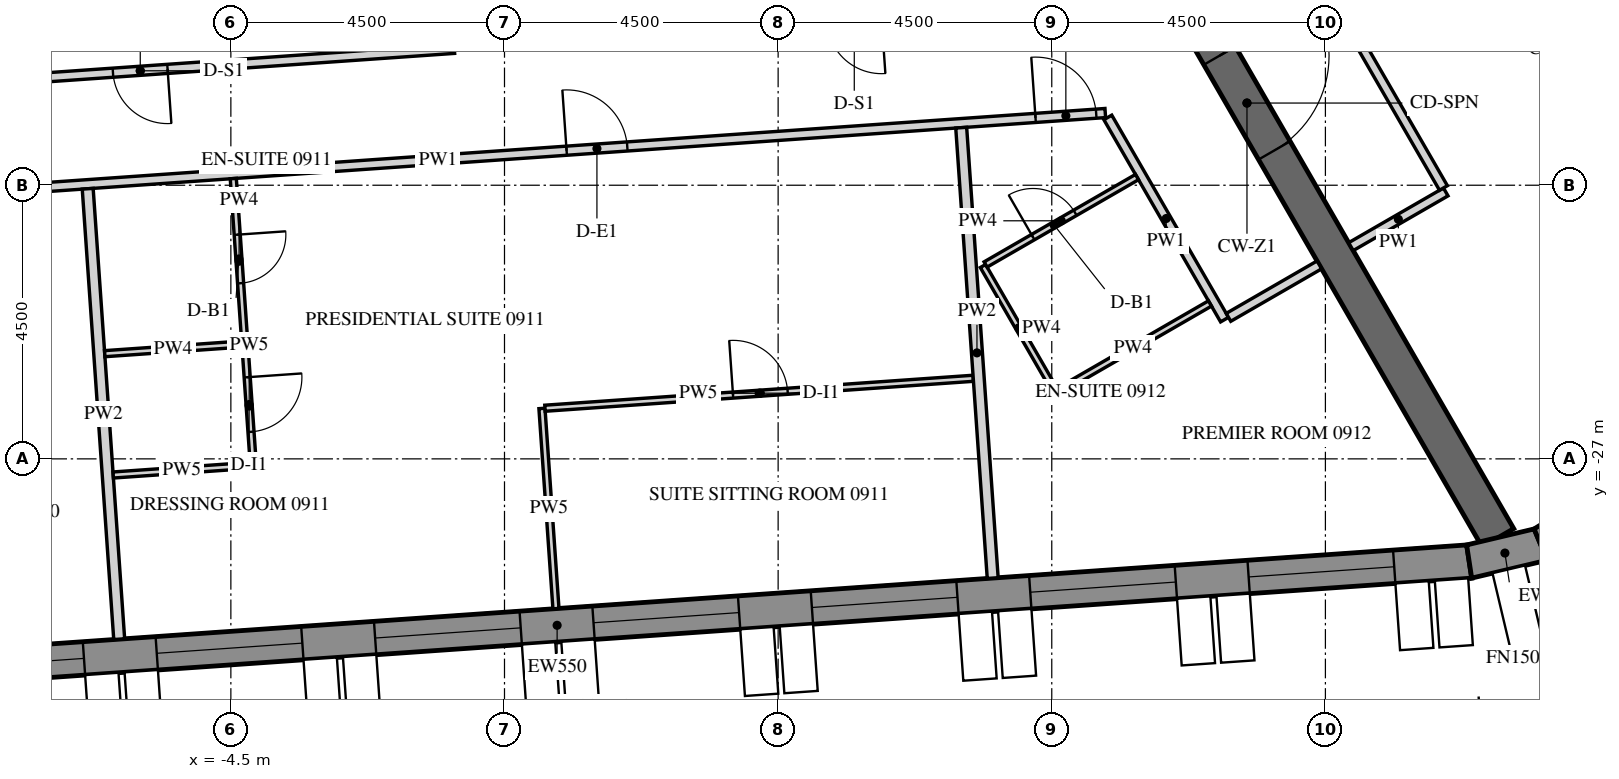
"""IFC4 building model, lengths in metres.
Left out: names, types, materials, properties, quantities, classifications, styles, units other than length and angle.
Written with IfcOpenShell. Run it as: python <this file> out.ifc"""

import sys

from ifc_helpers import new_model, si_unit, direction, frame, frame_2d, origin, place, context, subcontext, project, spatial, polyline, rectangle, outline, extrude, element, fill, save


model = new_model("IFC4")
c1 = context("Model", 3, precision=1e-05, world=origin(), true_north=direction((0.0, 1.0)))
c2 = subcontext(c1, "Body", "Model", "MODEL_VIEW")
j1 = project(units=[si_unit("LENGTHUNIT", "METRE"), si_unit("PLANEANGLEUNIT", "RADIAN")], contexts=[c1])
p1 = place(None, origin())
s1 = spatial("IfcSite", under=j1, at=p1, CompositionType="ELEMENT")
p2 = place(p1, origin())
s2 = spatial("IfcBuilding", under=s1, at=p2, CompositionType="ELEMENT")
p3 = place(p2, frame((0.0, 0.0, 123.3)))
s3 = spatial("IfcBuildingStorey", under=s2, at=p3, CompositionType="ELEMENT", Elevation=123.3)
p4 = place(p3, frame((-14.134, -30.786, -0.15), z_axis=(0.0, 0.0, 1.0), x_axis=(0.997564037441, 0.069756657061, 0.0)))
e1 = element("IfcWall", 1, at=p4, inside=s3, PredefinedType="SOLIDWALL", context=c2, shape_type="SweptSolid", body=[
    extrude(outline(polyline([(-0.026, -0.275), (30.094, -0.275), (30.049, 0.275), (0.026, 0.275), (-0.026, -0.275)])), origin(), (0.0, 0.0, 1.0), 3.9),
])
p5 = place(p4, frame((1.236, 0.0, 1.05)))
e2 = element("IfcOpeningElement", 2, at=p5, cuts=e1, PredefinedType="OPENING", context=c2, shape_type="SweptSolid", body=[
    extrude(rectangle(XDim=2.4, YDim=2.4, at=frame_2d((1.2, 1.2))), frame((0.0, 0.285, 0.0), z_axis=(0.0, -1.0, 0.0), x_axis=(1.0, 0.0, 0.0)), (0.0, 0.0, 1.0), 0.57),
])
p6 = place(p4, frame((4.835, 0.0, 1.05)))
e3 = element("IfcOpeningElement", 3, at=p6, cuts=e1, PredefinedType="OPENING", context=c2, shape_type="SweptSolid", body=[
    extrude(rectangle(XDim=2.4, YDim=2.4, at=frame_2d((1.2, 1.2))), frame((0.0, 0.285, 0.0), z_axis=(0.0, -1.0, 0.0), x_axis=(1.0, 0.0, 0.0)), (0.0, 0.0, 1.0), 0.57),
])
p7 = place(p4, frame((8.436, 0.0, 1.05)))
e4 = element("IfcOpeningElement", 4, at=p7, cuts=e1, PredefinedType="OPENING", context=c2, shape_type="SweptSolid", body=[
    extrude(rectangle(XDim=2.4, YDim=2.4, at=frame_2d((1.2, 1.2))), frame((0.0, 0.285, 0.0), z_axis=(0.0, -1.0, 0.0), x_axis=(1.0, 0.0, 0.0)), (0.0, 0.0, 1.0), 0.57),
])
p8 = place(p4, frame((12.035, 0.0, 1.05)))
e5 = element("IfcOpeningElement", 5, at=p8, cuts=e1, PredefinedType="OPENING", context=c2, shape_type="SweptSolid", body=[
    extrude(rectangle(XDim=2.4, YDim=2.4, at=frame_2d((1.2, 1.2))), frame((0.0, 0.285, 0.0), z_axis=(0.0, -1.0, 0.0), x_axis=(1.0, 0.0, 0.0)), (0.0, 0.0, 1.0), 0.57),
])
p9 = place(p4, frame((15.635, 0.0, 1.05)))
e6 = element("IfcOpeningElement", 6, at=p9, cuts=e1, PredefinedType="OPENING", context=c2, shape_type="SweptSolid", body=[
    extrude(rectangle(XDim=2.4, YDim=2.4, at=frame_2d((1.2, 1.2))), frame((0.0, 0.285, 0.0), z_axis=(0.0, -1.0, 0.0), x_axis=(1.0, 0.0, 0.0)), (0.0, 0.0, 1.0), 0.57),
])
p10 = place(p4, frame((19.236, 0.0, 1.05)))
e7 = element("IfcOpeningElement", 7, at=p10, cuts=e1, PredefinedType="OPENING", context=c2, shape_type="SweptSolid", body=[
    extrude(rectangle(XDim=2.4, YDim=2.4, at=frame_2d((1.2, 1.2))), frame((0.0, 0.285, 0.0), z_axis=(0.0, -1.0, 0.0), x_axis=(1.0, 0.0, 0.0)), (0.0, 0.0, 1.0), 0.57),
])
p11 = place(p4, frame((22.835, 0.0, 1.05)))
e8 = element("IfcOpeningElement", 8, at=p11, cuts=e1, PredefinedType="OPENING", context=c2, shape_type="SweptSolid", body=[
    extrude(rectangle(XDim=2.4, YDim=2.4, at=frame_2d((1.2, 1.2))), frame((0.0, 0.285, 0.0), z_axis=(0.0, -1.0, 0.0), x_axis=(1.0, 0.0, 0.0)), (0.0, 0.0, 1.0), 0.57),
])
p12 = place(p4, frame((26.436, 0.0, 1.05)))
e9 = element("IfcOpeningElement", 9, at=p12, cuts=e1, PredefinedType="OPENING", context=c2, shape_type="SweptSolid", body=[
    extrude(rectangle(XDim=2.4, YDim=2.4, at=frame_2d((1.2, 1.2))), frame((0.0, 0.285, 0.0), z_axis=(0.0, -1.0, 0.0), x_axis=(1.0, 0.0, 0.0)), (0.0, 0.0, 1.0), 0.57),
])
p13 = place(p3, frame((15.864, -28.688, -0.15), z_axis=(0.0, 0.0, 1.0), x_axis=(0.973063591128, 0.230536868247, 0.0)))
e10 = element("IfcWall", 10, at=p13, inside=s3, PredefinedType="SOLIDWALL", context=c2, shape_type="SweptSolid", body=[
    extrude(outline(polyline([(-0.022, -0.275), (1.253, -0.275), (1.163, 0.275), (0.022, 0.275), (-0.022, -0.275)])), origin(), (0.0, 0.0, 1.0), 3.9),
])
p14 = place(p3, frame((17.04, -28.41, -0.15), z_axis=(0.0, 0.0, 1.0), x_axis=(0.847952888306, 0.530071598195, 0.0)))
e11 = element("IfcWall", 11, at=p14, inside=s3, PredefinedType="SOLIDWALL", context=c2, shape_type="SweptSolid", body=[
    extrude(outline(polyline([(-0.045, -0.275), (1.253, -0.275), (1.163, 0.275), (0.045, 0.275), (-0.045, -0.275)])), origin(), (0.0, 0.0, 1.0), 3.9),
])
p15 = place(p3, frame((8.083, -14.0, -0.15), z_axis=(0.0, 0.0, 1.0), x_axis=(0.499997680643, -0.866026742862, 0.0)))
e12 = element("IfcWall", 12, at=p15, inside=s3, PredefinedType="SHEAR", context=c2, shape_type="SweptSolid", body=[
    extrude(rectangle(XDim=16.509, YDim=0.6, at=frame_2d((8.254, 0.0))), origin(), (0.0, 0.0, 1.0), 3.9),
])
p16 = place(p15, frame((7.354, 0.0, 0.15)))
e13 = element("IfcOpeningElement", 13, at=p16, cuts=e12, PredefinedType="OPENING", context=c2, shape_type="SweptSolid", body=[
    extrude(rectangle(XDim=1.8, YDim=2.4, at=frame_2d((0.9, 1.2))), frame((0.0, 0.31, 0.0), z_axis=(0.0, -1.0, 0.0), x_axis=(1.0, 0.0, 0.0)), (0.0, 0.0, 1.0), 0.62),
])
p17 = place(p3, frame((-12.068, -22.847, 0.0), z_axis=(0.0, 0.0, 1.0), x_axis=(0.99756437486, 0.069751831595, 0.0)))
e14 = element("IfcWall", 14, at=p17, inside=s3, PredefinedType="PARTITIONING", context=c2, shape_type="SweptSolid", body=[
    extrude(rectangle(XDim=22.002, YDim=0.15, at=frame_2d((11.001, 0.0))), origin(), (0.0, 0.0, 1.0), 2.988),
])
p18 = place(p17, frame((3.169, 0.0, 0.0)))
e15 = element("IfcOpeningElement", 15, at=p18, cuts=e14, PredefinedType="OPENING", context=c2, shape_type="SweptSolid", body=[
    extrude(rectangle(XDim=1.0, YDim=2.1, at=frame_2d((0.5, 1.05))), frame((0.0, 0.085, 0.0), z_axis=(0.0, -1.0, 0.0), x_axis=(1.0, 0.0, 0.0)), (0.0, 0.0, 1.0), 0.17),
])
p19 = place(p17, frame((13.121, 0.0, 0.0)))
e16 = element("IfcOpeningElement", 16, at=p19, cuts=e14, PredefinedType="OPENING", context=c2, shape_type="SweptSolid", body=[
    extrude(rectangle(XDim=1.0, YDim=2.1, at=frame_2d((0.5, 1.05))), frame((0.0, 0.085, 0.0), z_axis=(0.0, -1.0, 0.0), x_axis=(1.0, 0.0, 0.0)), (0.0, 0.0, 1.0), 0.17),
])
p20 = place(p17, frame((20.852, 0.0, 0.0)))
e17 = element("IfcOpeningElement", 17, at=p20, cuts=e14, PredefinedType="OPENING", context=c2, shape_type="SweptSolid", body=[
    extrude(rectangle(XDim=1.0, YDim=2.1, at=frame_2d((0.5, 1.05))), frame((0.0, 0.085, 0.0), z_axis=(0.0, -1.0, 0.0), x_axis=(1.0, 0.0, 0.0)), (0.0, 0.0, 1.0), 0.17),
])
p21 = place(p3, frame((9.922, -21.385, 0.0), z_axis=(0.0, 0.0, 1.0), x_axis=(0.500003180287, -0.866023567637, 0.0)))
e18 = element("IfcWall", 18, at=p21, inside=s3, PredefinedType="PARTITIONING", context=c2, shape_type="SweptSolid", body=[
    extrude(rectangle(XDim=3.839, YDim=0.15, at=frame_2d((1.92, 0.0))), origin(), (0.0, 0.0, 1.0), 2.988),
])
p22 = place(p3, frame((11.906, -24.673, 0.0), z_axis=(0.0, 0.0, 1.0), x_axis=(0.866013532718, 0.500020560727, 0.0)))
e19 = element("IfcWall", 19, at=p22, inside=s3, PredefinedType="PARTITIONING", context=c2, shape_type="SweptSolid", body=[
    extrude(rectangle(XDim=1.725, YDim=0.15, at=frame_2d((0.863, 0.0))), origin(), (0.0, 0.0, 1.0), 2.988),
])
p23 = place(p3, frame((-0.825, -20.257, 0.0), z_axis=(0.0, 0.0, 1.0), x_axis=(-0.9975635143, -0.069764137903, 0.0)))
e20 = element("IfcWall", 20, at=p23, inside=s3, PredefinedType="PARTITIONING", context=c2, shape_type="SweptSolid", body=[
    extrude(rectangle(XDim=10.355, YDim=0.15, at=frame_2d((5.177, 0.0))), origin(), (0.0, 0.0, 1.0), 2.988),
])
p24 = place(p23, frame((4.728, 0.0, 0.0)))
e21 = element("IfcOpeningElement", 21, at=p24, cuts=e20, PredefinedType="OPENING", context=c2, shape_type="SweptSolid", body=[
    extrude(rectangle(XDim=0.9, YDim=2.1, at=frame_2d((0.45, 1.05))), frame((0.0, 0.085, 0.0), z_axis=(0.0, -1.0, 0.0), x_axis=(1.0, 0.0, 0.0)), (0.0, 0.0, 1.0), 0.17),
])
p25 = place(p3, frame((13.92, -23.51, 0.0), z_axis=(0.0, 0.0, 1.0), x_axis=(0.866047807691, 0.499961193289, 0.0)))
e22 = element("IfcWall", 22, at=p25, inside=s3, PredefinedType="PARTITIONING", context=c2, shape_type="SweptSolid", body=[
    extrude(rectangle(XDim=1.8, YDim=0.15, at=frame_2d((0.9, 0.0))), origin(), (0.0, 0.0, 1.0), 2.988),
])
p26 = place(p3, frame((15.441, -22.545, 0.0), z_axis=(0.0, 0.0, 1.0), x_axis=(-0.500037089193, 0.86600398927, 0.0)))
e23 = element("IfcWall", 23, at=p26, inside=s3, PredefinedType="PARTITIONING", context=c2, shape_type="SweptSolid", body=[
    extrude(rectangle(XDim=3.112, YDim=0.15, at=frame_2d((1.556, 0.0))), origin(), (0.0, 0.0, 1.0), 2.988),
])
p27 = place(p3, frame((-6.336, -29.965, 0.0), z_axis=(0.0, 0.0, 1.0), x_axis=(-0.06977252161, 0.997562927954, 0.0)))
e24 = element("IfcWall", 24, at=p27, inside=s3, PredefinedType="PARTITIONING", context=c2, shape_type="SweptSolid", body=[
    extrude(rectangle(XDim=7.425, YDim=0.18, at=frame_2d((3.712, 0.0))), origin(), (0.0, 0.0, 1.0), 2.988),
])
p28 = place(p3, frame((-4.46, -22.391, 0.0), z_axis=(0.0, 0.0, 1.0), x_axis=(0.069699857203, -0.99756800766, 0.0)))
e25 = element("IfcWall", 25, at=p28, inside=s3, PredefinedType="PARTITIONING", context=c2, shape_type="SweptSolid", body=[
    extrude(rectangle(XDim=2.725, YDim=0.1, at=frame_2d((1.363, 0.0))), origin(), (0.0, 0.0, 1.0), 2.988),
])
p29 = place(p28, frame((0.925, 0.0, 0.0)))
e26 = element("IfcOpeningElement", 26, at=p29, cuts=e25, PredefinedType="OPENING", context=c2, shape_type="SweptSolid", body=[
    extrude(rectangle(XDim=0.8, YDim=2.1, at=frame_2d((0.4, 1.05))), frame((0.0, 0.06, 0.0), z_axis=(0.0, -1.0, 0.0), x_axis=(1.0, 0.0, 0.0)), (0.0, 0.0, 1.0), 0.12),
])
p30 = place(p3, frame((-4.267, -25.159, 0.0), z_axis=(0.0, 0.0, 1.0), x_axis=(0.06985902805, -0.997556873667, 0.0)))
e27 = element("IfcWall", 27, at=p30, inside=s3, PredefinedType="PARTITIONING", context=c2, shape_type="SweptSolid", body=[
    extrude(rectangle(XDim=1.95, YDim=0.1, at=frame_2d((0.975, 0.0))), origin(), (0.0, 0.0, 1.0), 2.988),
])
p31 = place(p30, frame((0.5, 0.0, 0.0)))
e28 = element("IfcOpeningElement", 28, at=p31, cuts=e27, PredefinedType="OPENING", context=c2, shape_type="SweptSolid", body=[
    extrude(rectangle(XDim=0.9, YDim=2.1, at=frame_2d((0.45, 1.05))), frame((0.0, 0.06, 0.0), z_axis=(0.0, -1.0, 0.0), x_axis=(1.0, 0.0, 0.0)), (0.0, 0.0, 1.0), 0.12),
])
p32 = place(p3, frame((-4.18, -27.108, 0.0), z_axis=(0.0, 0.0, 1.0), x_axis=(-0.997561825928, -0.069788275888, 0.0)))
e29 = element("IfcWall", 29, at=p32, inside=s3, PredefinedType="PARTITIONING", context=c2, shape_type="SweptSolid", body=[
    extrude(rectangle(XDim=2.26, YDim=0.1, at=frame_2d((1.13, 0.0))), origin(), (0.0, 0.0, 1.0), 2.988),
])
p33 = place(p3, frame((0.846, -29.463, 0.0), z_axis=(0.0, 0.0, 1.0), x_axis=(-0.069769490542, 0.997563139951, 0.0)))
e30 = element("IfcWall", 30, at=p33, inside=s3, PredefinedType="PARTITIONING", context=c2, shape_type="SweptSolid", body=[
    extrude(rectangle(XDim=3.3, YDim=0.1, at=frame_2d((1.65, 0.0))), origin(), (0.0, 0.0, 1.0), 2.988),
])
p34 = place(p3, frame((0.666, -26.167, 0.0), z_axis=(0.0, 0.0, 1.0), x_axis=(0.997564648601, 0.069747916536, 0.0)))
e31 = element("IfcWall", 31, at=p34, inside=s3, PredefinedType="PARTITIONING", context=c2, shape_type="SweptSolid", body=[
    extrude(rectangle(XDim=7.06, YDim=0.1, at=frame_2d((3.53, 0.0))), origin(), (0.0, 0.0, 1.0), 2.988),
])
p35 = place(p34, frame((3.1, 0.0, 0.0)))
e32 = element("IfcOpeningElement", 32, at=p35, cuts=e31, PredefinedType="OPENING", context=c2, shape_type="SweptSolid", body=[
    extrude(rectangle(XDim=0.9, YDim=2.1, at=frame_2d((0.45, 1.05))), frame((0.0, 0.06, 0.0), z_axis=(0.0, -1.0, 0.0), x_axis=(1.0, 0.0, 0.0)), (0.0, 0.0, 1.0), 0.12),
])
p36 = place(p3, frame((8.029, -28.96, 0.0), z_axis=(0.0, 0.0, 1.0), x_axis=(-0.069739801019, 0.99756521599, 0.0)))
e33 = element("IfcWall", 33, at=p36, inside=s3, PredefinedType="PARTITIONING", context=c2, shape_type="SweptSolid", body=[
    extrude(rectangle(XDim=7.425, YDim=0.18, at=frame_2d((3.712, 0.0))), origin(), (0.0, 0.0, 1.0), 2.988),
])
p37 = place(p3, frame((-6.574, -25.27, 0.0), z_axis=(0.0, 0.0, 1.0), x_axis=(0.997562351999, 0.069780755754, 0.0)))
e34 = element("IfcWall", 34, at=p37, inside=s3, PredefinedType="PARTITIONING", context=c2, shape_type="SweptSolid", body=[
    extrude(rectangle(XDim=2.26, YDim=0.1, at=frame_2d((1.13, 0.0))), origin(), (0.0, 0.0, 1.0), 2.988),
])
p38 = place(p3, frame((11.602, -24.445, 0.0), z_axis=(0.0, 0.0, 1.0), x_axis=(-0.866046596414, -0.499963291492, 0.0)))
e35 = element("IfcWall", 35, at=p38, inside=s3, PredefinedType="PARTITIONING", context=c2, shape_type="SweptSolid", body=[
    extrude(rectangle(XDim=2.925, YDim=0.1, at=frame_2d((1.462, 0.0))), origin(), (0.0, 0.0, 1.0), 2.988),
])
p39 = place(p3, frame((9.043, -25.864, 0.0), z_axis=(0.0, 0.0, 1.0), x_axis=(-0.500016218704, 0.866016039709, 0.0)))
e36 = element("IfcWall", 36, at=p39, inside=s3, PredefinedType="PARTITIONING", context=c2, shape_type="SweptSolid", body=[
    extrude(rectangle(XDim=2.35, YDim=0.1, at=frame_2d((1.175, 0.0))), origin(), (0.0, 0.0, 1.0), 2.988),
])
p40 = place(p3, frame((7.912, -23.803, 0.0), z_axis=(0.0, 0.0, 1.0), x_axis=(0.866039941686, 0.499974818771, 0.0)))
e37 = element("IfcWall", 37, at=p40, inside=s3, PredefinedType="PARTITIONING", context=c2, shape_type="SweptSolid", body=[
    extrude(rectangle(XDim=2.875, YDim=0.1, at=frame_2d((1.438, 0.0))), origin(), (0.0, 0.0, 1.0), 2.988),
])
p41 = place(p40, frame((0.9, 0.0, 0.0)))
e38 = element("IfcOpeningElement", 38, at=p41, cuts=e37, PredefinedType="OPENING", context=c2, shape_type="SweptSolid", body=[
    extrude(rectangle(XDim=0.8, YDim=2.1, at=frame_2d((0.4, 1.05))), frame((0.0, 0.06, 0.0), z_axis=(0.0, -1.0, 0.0), x_axis=(1.0, 0.0, 0.0)), (0.0, 0.0, 1.0), 0.12),
])
p42 = place(p3, frame((-5.775, -14.0, 0.0), z_axis=(0.0, 0.0, 1.0), x_axis=(-0.381361051417, -0.924426172532, 0.0)))
e39 = element("IfcWall", 39, at=p42, inside=s3, PredefinedType="PARTITIONING", context=c2, shape_type="SweptSolid", body=[
    extrude(rectangle(XDim=7.271, YDim=0.12, at=frame_2d((3.636, 0.0))), origin(), (0.0, 0.0, 1.0), 2.988),
])
p43 = place(p6, frame((0.0, 0.205, 0.0)))
e40 = element("IfcWindow", 40, at=p43, inside=s3, PartitioningType="DOUBLE_PANEL_VERTICAL", PredefinedType="WINDOW", context=c2, shape_type="SweptSolid", body=[
    extrude(rectangle(XDim=2.4, YDim=2.4, at=frame_2d((1.2, 1.2))), frame((0.0, 0.03, 0.0), z_axis=(0.0, -1.0, 0.0), x_axis=(1.0, 0.0, 0.0)), (0.0, 0.0, 1.0), 0.06),
])
fill(e3, e40)
p44 = place(p7, frame((0.0, 0.205, 0.0)))
e41 = element("IfcWindow", 41, at=p44, inside=s3, PartitioningType="DOUBLE_PANEL_VERTICAL", PredefinedType="WINDOW", context=c2, shape_type="SweptSolid", body=[
    extrude(rectangle(XDim=2.4, YDim=2.4, at=frame_2d((1.2, 1.2))), frame((0.0, 0.03, 0.0), z_axis=(0.0, -1.0, 0.0), x_axis=(1.0, 0.0, 0.0)), (0.0, 0.0, 1.0), 0.06),
])
fill(e4, e41)
p45 = place(p8, frame((0.0, 0.205, 0.0)))
e42 = element("IfcWindow", 42, at=p45, inside=s3, PartitioningType="DOUBLE_PANEL_VERTICAL", PredefinedType="WINDOW", context=c2, shape_type="SweptSolid", body=[
    extrude(rectangle(XDim=2.4, YDim=2.4, at=frame_2d((1.2, 1.2))), frame((0.0, 0.03, 0.0), z_axis=(0.0, -1.0, 0.0), x_axis=(1.0, 0.0, 0.0)), (0.0, 0.0, 1.0), 0.06),
])
fill(e5, e42)
p46 = place(p9, frame((0.0, 0.205, 0.0)))
e43 = element("IfcWindow", 43, at=p46, inside=s3, PartitioningType="DOUBLE_PANEL_VERTICAL", PredefinedType="WINDOW", context=c2, shape_type="SweptSolid", body=[
    extrude(rectangle(XDim=2.4, YDim=2.4, at=frame_2d((1.2, 1.2))), frame((0.0, 0.03, 0.0), z_axis=(0.0, -1.0, 0.0), x_axis=(1.0, 0.0, 0.0)), (0.0, 0.0, 1.0), 0.06),
])
fill(e6, e43)
p47 = place(p10, frame((0.0, 0.205, 0.0)))
e44 = element("IfcWindow", 44, at=p47, inside=s3, PartitioningType="DOUBLE_PANEL_VERTICAL", PredefinedType="WINDOW", context=c2, shape_type="SweptSolid", body=[
    extrude(rectangle(XDim=2.4, YDim=2.4, at=frame_2d((1.2, 1.2))), frame((0.0, 0.03, 0.0), z_axis=(0.0, -1.0, 0.0), x_axis=(1.0, 0.0, 0.0)), (0.0, 0.0, 1.0), 0.06),
])
fill(e7, e44)
p48 = place(p11, frame((0.0, 0.205, 0.0)))
e45 = element("IfcWindow", 45, at=p48, inside=s3, PartitioningType="DOUBLE_PANEL_VERTICAL", PredefinedType="WINDOW", context=c2, shape_type="SweptSolid", body=[
    extrude(rectangle(XDim=2.4, YDim=2.4, at=frame_2d((1.2, 1.2))), frame((0.0, 0.03, 0.0), z_axis=(0.0, -1.0, 0.0), x_axis=(1.0, 0.0, 0.0)), (0.0, 0.0, 1.0), 0.06),
])
fill(e8, e45)
p49 = place(p12, frame((0.0, 0.205, 0.0)))
e46 = element("IfcWindow", 46, at=p49, inside=s3, PartitioningType="DOUBLE_PANEL_VERTICAL", PredefinedType="WINDOW", context=c2, shape_type="SweptSolid", body=[
    extrude(rectangle(XDim=2.4, YDim=2.4, at=frame_2d((1.2, 1.2))), frame((0.0, 0.03, 0.0), z_axis=(0.0, -1.0, 0.0), x_axis=(1.0, 0.0, 0.0)), (0.0, 0.0, 1.0), 0.06),
])
fill(e9, e46)
p50 = place(p16, origin())
e47 = element("IfcDoor", 47, at=p50, inside=s3, OperationType="DOUBLE_DOOR_SINGLE_SWING", PredefinedType="DOOR", context=c2, shape_type="SweptSolid", body=[
    extrude(rectangle(XDim=1.8, YDim=2.4, at=frame_2d((0.9, 1.2))), frame((0.0, 0.025, 0.0), z_axis=(0.0, -1.0, 0.0), x_axis=(1.0, 0.0, 0.0)), (0.0, 0.0, 1.0), 0.05),
])
fill(e13, e47)
p51 = place(p19, origin())
e48 = element("IfcDoor", 48, at=p51, inside=s3, OperationType="SINGLE_SWING_RIGHT", PredefinedType="DOOR", context=c2, shape_type="SweptSolid", body=[
    extrude(rectangle(XDim=1.0, YDim=2.1, at=frame_2d((0.5, 1.05))), frame((0.0, 0.025, 0.0), z_axis=(0.0, -1.0, 0.0), x_axis=(1.0, 0.0, 0.0)), (0.0, 0.0, 1.0), 0.05),
])
fill(e16, e48)
p52 = place(p29, origin())
e49 = element("IfcDoor", 49, at=p52, inside=s3, OperationType="SINGLE_SWING_RIGHT", PredefinedType="DOOR", context=c2, shape_type="SweptSolid", body=[
    extrude(rectangle(XDim=0.8, YDim=2.1, at=frame_2d((0.4, 1.05))), frame((0.0, 0.025, 0.0), z_axis=(0.0, -1.0, 0.0), x_axis=(1.0, 0.0, 0.0)), (0.0, 0.0, 1.0), 0.05),
])
fill(e26, e49)
p53 = place(p31, origin())
e50 = element("IfcDoor", 50, at=p53, inside=s3, OperationType="SINGLE_SWING_RIGHT", PredefinedType="DOOR", context=c2, shape_type="SweptSolid", body=[
    extrude(rectangle(XDim=0.9, YDim=2.1, at=frame_2d((0.45, 1.05))), frame((0.0, 0.025, 0.0), z_axis=(0.0, -1.0, 0.0), x_axis=(1.0, 0.0, 0.0)), (0.0, 0.0, 1.0), 0.05),
])
fill(e28, e50)
p54 = place(p35, origin())
e51 = element("IfcDoor", 51, at=p54, inside=s3, OperationType="SINGLE_SWING_LEFT", PredefinedType="DOOR", context=c2, shape_type="SweptSolid", body=[
    extrude(rectangle(XDim=0.9, YDim=2.1, at=frame_2d((0.45, 1.05))), frame((0.0, 0.025, 0.0), z_axis=(0.0, -1.0, 0.0), x_axis=(1.0, 0.0, 0.0)), (0.0, 0.0, 1.0), 0.05),
])
fill(e32, e51)
p55 = place(p20, origin())
e52 = element("IfcDoor", 52, at=p55, inside=s3, OperationType="SINGLE_SWING_LEFT", PredefinedType="DOOR", context=c2, shape_type="SweptSolid", body=[
    extrude(rectangle(XDim=1.0, YDim=2.1, at=frame_2d((0.5, 1.05))), frame((0.0, 0.025, 0.0), z_axis=(0.0, -1.0, 0.0), x_axis=(1.0, 0.0, 0.0)), (0.0, 0.0, 1.0), 0.05),
])
fill(e17, e52)
p56 = place(p41, origin())
e53 = element("IfcDoor", 53, at=p56, inside=s3, OperationType="SINGLE_SWING_RIGHT", PredefinedType="DOOR", context=c2, shape_type="SweptSolid", body=[
    extrude(rectangle(XDim=0.8, YDim=2.1, at=frame_2d((0.4, 1.05))), frame((0.0, 0.025, 0.0), z_axis=(0.0, -1.0, 0.0), x_axis=(1.0, 0.0, 0.0)), (0.0, 0.0, 1.0), 0.05),
])
fill(e38, e53)
p57 = place(p24, origin())
e54 = element("IfcDoor", 54, at=p57, inside=s3, OperationType="SINGLE_SWING_LEFT", PredefinedType="DOOR", context=c2, shape_type="SweptSolid", body=[
    extrude(rectangle(XDim=0.9, YDim=2.1, at=frame_2d((0.45, 1.05))), frame((0.0, 0.025, 0.0), z_axis=(0.0, -1.0, 0.0), x_axis=(1.0, 0.0, 0.0)), (0.0, 0.0, 1.0), 0.05),
])
fill(e21, e54)
save(model, sys.argv[1])
